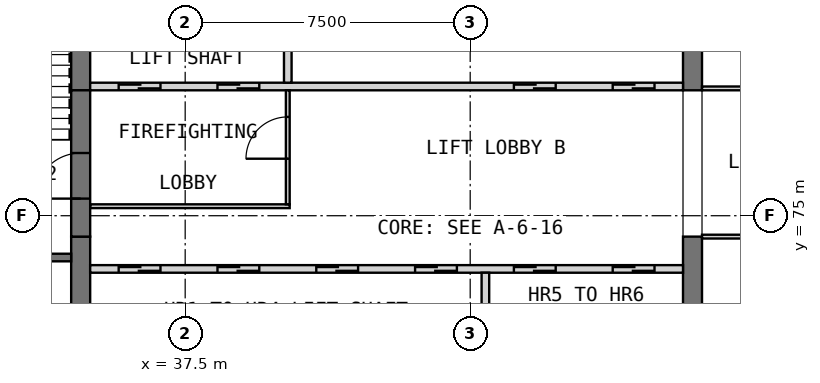
"""IFC4 building model, lengths in metres.
Left out: names, types, materials, properties, quantities, classifications, styles, units other than length and angle.
Written with IfcOpenShell. Run it as: python <this file> out.ifc"""

import sys

from ifc_helpers import new_model, si_unit, direction, frame, frame_2d, origin, place, context, subcontext, project, spatial, rectangle, extrude, element, fill, save


model = new_model("IFC4")
c1 = context("Model", 3, precision=1e-05, world=origin(), true_north=direction((0.0, 1.0)))
c2 = subcontext(c1, "Body", "Model", "MODEL_VIEW")
j1 = project(units=[si_unit("LENGTHUNIT", "METRE"), si_unit("PLANEANGLEUNIT", "RADIAN")], contexts=[c1])
p1 = place(None, origin())
s1 = spatial("IfcSite", under=j1, at=p1, CompositionType="ELEMENT")
p2 = place(p1, origin())
s2 = spatial("IfcBuilding", under=s1, at=p2, CompositionType="ELEMENT")
p3 = place(p2, frame((0.0, 0.0, 133.8)))
s3 = spatial("IfcBuildingStorey", under=s2, at=p3, CompositionType="ELEMENT", Elevation=133.8)
p4 = place(p3, frame((34.75, 68.05, 0.0), z_axis=(0.0, 0.0, 1.0), x_axis=(0.0, 1.0, 0.0)))
e1 = element("IfcWall", 1, at=p4, inside=s3, PredefinedType="SHEAR", context=c2, shape_type="SweptSolid", body=[
    extrude(rectangle(XDim=6.4, YDim=0.5, at=frame_2d((3.2, 0.0))), origin(), (0.0, 0.0, 1.0), 3.6),
])
p5 = place(p3, frame((34.75, 78.3, 0.0), z_axis=(0.0, 0.0, 1.0), x_axis=(0.0, 1.0, 0.0)))
e2 = element("IfcWall", 2, at=p5, inside=s3, PredefinedType="SHEAR", context=c2, shape_type="SweptSolid", body=[
    extrude(rectangle(XDim=3.4, YDim=0.5, at=frame_2d((1.7, 0.0))), origin(), (0.0, 0.0, 1.0), 3.6),
])
p6 = place(p3, frame((50.85, 68.05, 0.0), z_axis=(0.0, 0.0, 1.0), x_axis=(0.0, 1.0, 0.0)))
e3 = element("IfcWall", 3, at=p6, inside=s3, PredefinedType="SHEAR", context=c2, shape_type="SweptSolid", body=[
    extrude(rectangle(XDim=6.4, YDim=0.5, at=frame_2d((3.2, 0.0))), origin(), (0.0, 0.0, 1.0), 3.6),
])
p7 = place(p3, frame((50.85, 78.3, 0.0), z_axis=(0.0, 0.0, 1.0), x_axis=(0.0, 1.0, 0.0)))
e4 = element("IfcWall", 4, at=p7, inside=s3, PredefinedType="SHEAR", context=c2, shape_type="SweptSolid", body=[
    extrude(rectangle(XDim=3.4, YDim=0.5, at=frame_2d((1.7, 0.0))), origin(), (0.0, 0.0, 1.0), 3.6),
])
p8 = place(p3, frame((35.0, 73.6, 0.0), z_axis=(0.0, 0.0, 1.0), x_axis=(1.0, 0.0, 0.0)))
e5 = element("IfcWall", 5, at=p8, inside=s3, PredefinedType="SOLIDWALL", context=c2, shape_type="SweptSolid", body=[
    extrude(rectangle(XDim=15.6, YDim=0.2, at=frame_2d((7.8, 0.0))), origin(), (0.0, 0.0, 1.0), 3.6),
])
p9 = place(p8, frame((0.75, 0.0, 0.0)))
e6 = element("IfcOpeningElement", 6, at=p9, cuts=e5, PredefinedType="OPENING", context=c2, shape_type="SweptSolid", body=[
    extrude(rectangle(XDim=1.1, YDim=2.1, at=frame_2d((0.55, 1.05))), frame((0.0, 0.11, 0.0), z_axis=(0.0, -1.0, 0.0), x_axis=(1.0, 0.0, 0.0)), (0.0, 0.0, 1.0), 0.22),
])
p10 = place(p8, frame((3.35, 0.0, 0.0)))
e7 = element("IfcOpeningElement", 7, at=p10, cuts=e5, PredefinedType="OPENING", context=c2, shape_type="SweptSolid", body=[
    extrude(rectangle(XDim=1.1, YDim=2.1, at=frame_2d((0.55, 1.05))), frame((0.0, 0.11, 0.0), z_axis=(0.0, -1.0, 0.0), x_axis=(1.0, 0.0, 0.0)), (0.0, 0.0, 1.0), 0.22),
])
p11 = place(p8, frame((5.95, 0.0, 0.0)))
e8 = element("IfcOpeningElement", 8, at=p11, cuts=e5, PredefinedType="OPENING", context=c2, shape_type="SweptSolid", body=[
    extrude(rectangle(XDim=1.1, YDim=2.1, at=frame_2d((0.55, 1.05))), frame((0.0, 0.11, 0.0), z_axis=(0.0, -1.0, 0.0), x_axis=(1.0, 0.0, 0.0)), (0.0, 0.0, 1.0), 0.22),
])
p12 = place(p8, frame((8.55, 0.0, 0.0)))
e9 = element("IfcOpeningElement", 9, at=p12, cuts=e5, PredefinedType="OPENING", context=c2, shape_type="SweptSolid", body=[
    extrude(rectangle(XDim=1.1, YDim=2.1, at=frame_2d((0.55, 1.05))), frame((0.0, 0.11, 0.0), z_axis=(0.0, -1.0, 0.0), x_axis=(1.0, 0.0, 0.0)), (0.0, 0.0, 1.0), 0.22),
])
p13 = place(p8, frame((11.15, 0.0, 0.0)))
e10 = element("IfcOpeningElement", 10, at=p13, cuts=e5, PredefinedType="OPENING", context=c2, shape_type="SweptSolid", body=[
    extrude(rectangle(XDim=1.1, YDim=2.1, at=frame_2d((0.55, 1.05))), frame((0.0, 0.11, 0.0), z_axis=(0.0, -1.0, 0.0), x_axis=(1.0, 0.0, 0.0)), (0.0, 0.0, 1.0), 0.22),
])
p14 = place(p8, frame((13.75, 0.0, 0.0)))
e11 = element("IfcOpeningElement", 11, at=p14, cuts=e5, PredefinedType="OPENING", context=c2, shape_type="SweptSolid", body=[
    extrude(rectangle(XDim=1.1, YDim=2.1, at=frame_2d((0.55, 1.05))), frame((0.0, 0.11, 0.0), z_axis=(0.0, -1.0, 0.0), x_axis=(1.0, 0.0, 0.0)), (0.0, 0.0, 1.0), 0.22),
])
p15 = place(p3, frame((45.4, 71.5, 0.0), z_axis=(0.0, 0.0, 1.0), x_axis=(0.0, 1.0, 0.0)))
e12 = element("IfcWall", 12, at=p15, inside=s3, PredefinedType="SOLIDWALL", context=c2, shape_type="SweptSolid", body=[
    extrude(rectangle(XDim=2.0, YDim=0.2, at=frame_2d((1.0, 0.0))), origin(), (0.0, 0.0, 1.0), 3.6),
])
p16 = place(p3, frame((35.0, 78.4, 0.0), z_axis=(0.0, 0.0, 1.0), x_axis=(1.0, 0.0, 0.0)))
e13 = element("IfcWall", 13, at=p16, inside=s3, PredefinedType="SOLIDWALL", context=c2, shape_type="SweptSolid", body=[
    extrude(rectangle(XDim=15.6, YDim=0.2, at=frame_2d((7.8, 0.0))), origin(), (0.0, 0.0, 1.0), 3.6),
])
p17 = place(p16, frame((0.75, 0.0, 0.0)))
e14 = element("IfcOpeningElement", 14, at=p17, cuts=e13, PredefinedType="OPENING", context=c2, shape_type="SweptSolid", body=[
    extrude(rectangle(XDim=1.1, YDim=2.1, at=frame_2d((0.55, 1.05))), frame((0.0, 0.11, 0.0), z_axis=(0.0, -1.0, 0.0), x_axis=(1.0, 0.0, 0.0)), (0.0, 0.0, 1.0), 0.22),
])
p18 = place(p16, frame((3.35, 0.0, 0.0)))
e15 = element("IfcOpeningElement", 15, at=p18, cuts=e13, PredefinedType="OPENING", context=c2, shape_type="SweptSolid", body=[
    extrude(rectangle(XDim=1.1, YDim=2.1, at=frame_2d((0.55, 1.05))), frame((0.0, 0.11, 0.0), z_axis=(0.0, -1.0, 0.0), x_axis=(1.0, 0.0, 0.0)), (0.0, 0.0, 1.0), 0.22),
])
p19 = place(p16, frame((11.15, 0.0, 0.0)))
e16 = element("IfcOpeningElement", 16, at=p19, cuts=e13, PredefinedType="OPENING", context=c2, shape_type="SweptSolid", body=[
    extrude(rectangle(XDim=1.1, YDim=2.1, at=frame_2d((0.55, 1.05))), frame((0.0, 0.11, 0.0), z_axis=(0.0, -1.0, 0.0), x_axis=(1.0, 0.0, 0.0)), (0.0, 0.0, 1.0), 0.22),
])
p20 = place(p16, frame((13.75, 0.0, 0.0)))
e17 = element("IfcOpeningElement", 17, at=p20, cuts=e13, PredefinedType="OPENING", context=c2, shape_type="SweptSolid", body=[
    extrude(rectangle(XDim=1.1, YDim=2.1, at=frame_2d((0.55, 1.05))), frame((0.0, 0.11, 0.0), z_axis=(0.0, -1.0, 0.0), x_axis=(1.0, 0.0, 0.0)), (0.0, 0.0, 1.0), 0.22),
])
p21 = place(p3, frame((40.2, 78.5, 0.0), z_axis=(0.0, 0.0, 1.0), x_axis=(0.0, 1.0, 0.0)))
e18 = element("IfcWall", 18, at=p21, inside=s3, PredefinedType="SOLIDWALL", context=c2, shape_type="SweptSolid", body=[
    extrude(rectangle(XDim=3.2, YDim=0.2, at=frame_2d((1.6, 0.0))), origin(), (0.0, 0.0, 1.0), 3.6),
])
p22 = place(p3, frame((35.0, 75.25, 0.0), z_axis=(0.0, 0.0, 1.0), x_axis=(1.0, 0.0, 0.0)))
e19 = element("IfcWall", 19, at=p22, inside=s3, PredefinedType="PARTITIONING", context=c2, shape_type="SweptSolid", body=[
    extrude(rectangle(XDim=5.25, YDim=0.1, at=frame_2d((2.625, 0.0))), origin(), (0.0, 0.0, 1.0), 3.35),
])
p23 = place(p3, frame((40.2, 75.3, 0.0), z_axis=(0.0, 0.0, 1.0), x_axis=(0.0, 1.0, 0.0)))
e20 = element("IfcWall", 20, at=p23, inside=s3, PredefinedType="PARTITIONING", context=c2, shape_type="SweptSolid", body=[
    extrude(rectangle(XDim=3.0, YDim=0.1, at=frame_2d((1.5, 0.0))), origin(), (0.0, 0.0, 1.0), 3.35),
])
p24 = place(p23, frame((1.2, 0.0, 0.0)))
e21 = element("IfcOpeningElement", 21, at=p24, cuts=e20, PredefinedType="OPENING", context=c2, shape_type="SweptSolid", body=[
    extrude(rectangle(XDim=1.1, YDim=2.1, at=frame_2d((0.55, 1.05))), frame((0.0, 0.06, 0.0), z_axis=(0.0, -1.0, 0.0), x_axis=(1.0, 0.0, 0.0)), (0.0, 0.0, 1.0), 0.12),
])
p25 = place(p3, frame((34.75, 74.45, 0.0), z_axis=(0.0, 0.0, 1.0), x_axis=(0.0, 1.0, 0.0)))
e22 = element("IfcWall", 22, at=p25, inside=s3, PredefinedType="SOLIDWALL", context=c2, shape_type="SweptSolid", body=[
    extrude(rectangle(XDim=3.85, YDim=0.5, at=frame_2d((1.925, 0.0))), origin(), (0.0, 0.0, 1.0), 2.4),
])
p26 = place(p25, frame((1.0, 0.0, 0.0)))
e23 = element("IfcOpeningElement", 23, at=p26, cuts=e22, PredefinedType="OPENING", context=c2, shape_type="SweptSolid", body=[
    extrude(rectangle(XDim=1.2, YDim=2.1, at=frame_2d((0.6, 1.05))), frame((0.0, 0.26, 0.0), z_axis=(0.0, -1.0, 0.0), x_axis=(1.0, 0.0, 0.0)), (0.0, 0.0, 1.0), 0.52),
])
p27 = place(p3, frame((30.8, 73.9, 0.0), z_axis=(0.0, 0.0, 1.0), x_axis=(1.0, 0.0, 0.0)))
e24 = element("IfcWall", 24, at=p27, inside=s3, PredefinedType="SOLIDWALL", context=c2, shape_type="SweptSolid", body=[
    extrude(rectangle(XDim=3.7, YDim=0.2, at=frame_2d((1.85, 0.0))), origin(), (0.0, 0.0, 1.0), 3.35),
])
p28 = place(p27, frame((1.5, 0.0, 0.0)))
e25 = element("IfcOpeningElement", 25, at=p28, cuts=e24, PredefinedType="OPENING", context=c2, shape_type="SweptSolid", body=[
    extrude(rectangle(XDim=0.9, YDim=2.1, at=frame_2d((0.45, 1.05))), frame((0.0, 0.11, 0.0), z_axis=(0.0, -1.0, 0.0), x_axis=(1.0, 0.0, 0.0)), (0.0, 0.0, 1.0), 0.22),
])
p29 = place(p3, frame((51.1, 74.45, 0.0), z_axis=(0.0, 0.0, 1.0), x_axis=(1.0, 0.0, 0.0)))
e26 = element("IfcWall", 26, at=p29, inside=s3, PredefinedType="PARTITIONING", context=c2, shape_type="SweptSolid", body=[
    extrude(rectangle(XDim=8.1, YDim=0.1, at=frame_2d((4.05, 0.0))), origin(), (0.0, 0.0, 1.0), 3.35),
])
p30 = place(p29, frame((3.6, 0.0, 0.0)))
e27 = element("IfcOpeningElement", 27, at=p30, cuts=e26, PredefinedType="OPENING", context=c2, shape_type="SweptSolid", body=[
    extrude(rectangle(XDim=0.9, YDim=2.1, at=frame_2d((0.45, 1.05))), frame((0.0, 0.06, 0.0), z_axis=(0.0, -1.0, 0.0), x_axis=(1.0, 0.0, 0.0)), (0.0, 0.0, 1.0), 0.12),
])
p31 = place(p3, frame((51.1, 78.35, 0.0), z_axis=(0.0, 0.0, 1.0), x_axis=(1.0, 0.0, 0.0)))
e28 = element("IfcWall", 28, at=p31, inside=s3, PredefinedType="PARTITIONING", context=c2, shape_type="SweptSolid", body=[
    extrude(rectangle(XDim=8.1, YDim=0.1, at=frame_2d((4.05, 0.0))), origin(), (0.0, 0.0, 1.0), 3.35),
])
p32 = place(p31, frame((3.6, 0.0, 0.0)))
e29 = element("IfcOpeningElement", 29, at=p32, cuts=e28, PredefinedType="OPENING", context=c2, shape_type="SweptSolid", body=[
    extrude(rectangle(XDim=0.9, YDim=2.1, at=frame_2d((0.45, 1.05))), frame((0.0, 0.06, 0.0), z_axis=(0.0, -1.0, 0.0), x_axis=(1.0, 0.0, 0.0)), (0.0, 0.0, 1.0), 0.12),
])
p33 = place(p9, origin())
e30 = element("IfcDoor", 30, at=p33, inside=s3, OperationType="DOUBLE_DOOR_SLIDING", PredefinedType="DOOR", context=c2, shape_type="SweptSolid", body=[
    extrude(rectangle(XDim=1.1, YDim=2.1, at=frame_2d((0.55, 1.05))), frame((0.0, 0.025, 0.0), z_axis=(0.0, -1.0, 0.0), x_axis=(1.0, 0.0, 0.0)), (0.0, 0.0, 1.0), 0.05),
])
fill(e6, e30)
p34 = place(p10, origin())
e31 = element("IfcDoor", 31, at=p34, inside=s3, OperationType="DOUBLE_DOOR_SLIDING", PredefinedType="DOOR", context=c2, shape_type="SweptSolid", body=[
    extrude(rectangle(XDim=1.1, YDim=2.1, at=frame_2d((0.55, 1.05))), frame((0.0, 0.025, 0.0), z_axis=(0.0, -1.0, 0.0), x_axis=(1.0, 0.0, 0.0)), (0.0, 0.0, 1.0), 0.05),
])
fill(e7, e31)
p35 = place(p11, origin())
e32 = element("IfcDoor", 32, at=p35, inside=s3, OperationType="DOUBLE_DOOR_SLIDING", PredefinedType="DOOR", context=c2, shape_type="SweptSolid", body=[
    extrude(rectangle(XDim=1.1, YDim=2.1, at=frame_2d((0.55, 1.05))), frame((0.0, 0.025, 0.0), z_axis=(0.0, -1.0, 0.0), x_axis=(1.0, 0.0, 0.0)), (0.0, 0.0, 1.0), 0.05),
])
fill(e8, e32)
p36 = place(p12, origin())
e33 = element("IfcDoor", 33, at=p36, inside=s3, OperationType="DOUBLE_DOOR_SLIDING", PredefinedType="DOOR", context=c2, shape_type="SweptSolid", body=[
    extrude(rectangle(XDim=1.1, YDim=2.1, at=frame_2d((0.55, 1.05))), frame((0.0, 0.025, 0.0), z_axis=(0.0, -1.0, 0.0), x_axis=(1.0, 0.0, 0.0)), (0.0, 0.0, 1.0), 0.05),
])
fill(e9, e33)
p37 = place(p13, origin())
e34 = element("IfcDoor", 34, at=p37, inside=s3, OperationType="DOUBLE_DOOR_SLIDING", PredefinedType="DOOR", context=c2, shape_type="SweptSolid", body=[
    extrude(rectangle(XDim=1.1, YDim=2.1, at=frame_2d((0.55, 1.05))), frame((0.0, 0.025, 0.0), z_axis=(0.0, -1.0, 0.0), x_axis=(1.0, 0.0, 0.0)), (0.0, 0.0, 1.0), 0.05),
])
fill(e10, e34)
p38 = place(p14, origin())
e35 = element("IfcDoor", 35, at=p38, inside=s3, OperationType="DOUBLE_DOOR_SLIDING", PredefinedType="DOOR", context=c2, shape_type="SweptSolid", body=[
    extrude(rectangle(XDim=1.1, YDim=2.1, at=frame_2d((0.55, 1.05))), frame((0.0, 0.025, 0.0), z_axis=(0.0, -1.0, 0.0), x_axis=(1.0, 0.0, 0.0)), (0.0, 0.0, 1.0), 0.05),
])
fill(e11, e35)
p39 = place(p17, origin())
e36 = element("IfcDoor", 36, at=p39, inside=s3, OperationType="DOUBLE_DOOR_SLIDING", PredefinedType="DOOR", context=c2, shape_type="SweptSolid", body=[
    extrude(rectangle(XDim=1.1, YDim=2.1, at=frame_2d((0.55, 1.05))), frame((0.0, 0.025, 0.0), z_axis=(0.0, -1.0, 0.0), x_axis=(1.0, 0.0, 0.0)), (0.0, 0.0, 1.0), 0.05),
])
fill(e14, e36)
p40 = place(p18, origin())
e37 = element("IfcDoor", 37, at=p40, inside=s3, OperationType="DOUBLE_DOOR_SLIDING", PredefinedType="DOOR", context=c2, shape_type="SweptSolid", body=[
    extrude(rectangle(XDim=1.1, YDim=2.1, at=frame_2d((0.55, 1.05))), frame((0.0, 0.025, 0.0), z_axis=(0.0, -1.0, 0.0), x_axis=(1.0, 0.0, 0.0)), (0.0, 0.0, 1.0), 0.05),
])
fill(e15, e37)
p41 = place(p19, origin())
e38 = element("IfcDoor", 38, at=p41, inside=s3, OperationType="DOUBLE_DOOR_SLIDING", PredefinedType="DOOR", context=c2, shape_type="SweptSolid", body=[
    extrude(rectangle(XDim=1.1, YDim=2.1, at=frame_2d((0.55, 1.05))), frame((0.0, 0.025, 0.0), z_axis=(0.0, -1.0, 0.0), x_axis=(1.0, 0.0, 0.0)), (0.0, 0.0, 1.0), 0.05),
])
fill(e16, e38)
p42 = place(p20, origin())
e39 = element("IfcDoor", 39, at=p42, inside=s3, OperationType="DOUBLE_DOOR_SLIDING", PredefinedType="DOOR", context=c2, shape_type="SweptSolid", body=[
    extrude(rectangle(XDim=1.1, YDim=2.1, at=frame_2d((0.55, 1.05))), frame((0.0, 0.025, 0.0), z_axis=(0.0, -1.0, 0.0), x_axis=(1.0, 0.0, 0.0)), (0.0, 0.0, 1.0), 0.05),
])
fill(e17, e39)
p43 = place(p24, origin())
e40 = element("IfcDoor", 40, at=p43, inside=s3, OperationType="SINGLE_SWING_LEFT", PredefinedType="DOOR", context=c2, shape_type="SweptSolid", body=[
    extrude(rectangle(XDim=1.1, YDim=2.1, at=frame_2d((0.55, 1.05))), frame((0.0, 0.025, 0.0), z_axis=(0.0, -1.0, 0.0), x_axis=(1.0, 0.0, 0.0)), (0.0, 0.0, 1.0), 0.05),
])
fill(e21, e40)
p44 = place(p26, origin())
e41 = element("IfcDoor", 41, at=p44, inside=s3, OperationType="SINGLE_SWING_RIGHT", PredefinedType="DOOR", context=c2, shape_type="SweptSolid", body=[
    extrude(rectangle(XDim=1.2, YDim=2.1, at=frame_2d((0.6, 1.05))), frame((0.0, 0.025, 0.0), z_axis=(0.0, -1.0, 0.0), x_axis=(1.0, 0.0, 0.0)), (0.0, 0.0, 1.0), 0.05),
])
fill(e23, e41)
save(model, sys.argv[1])
